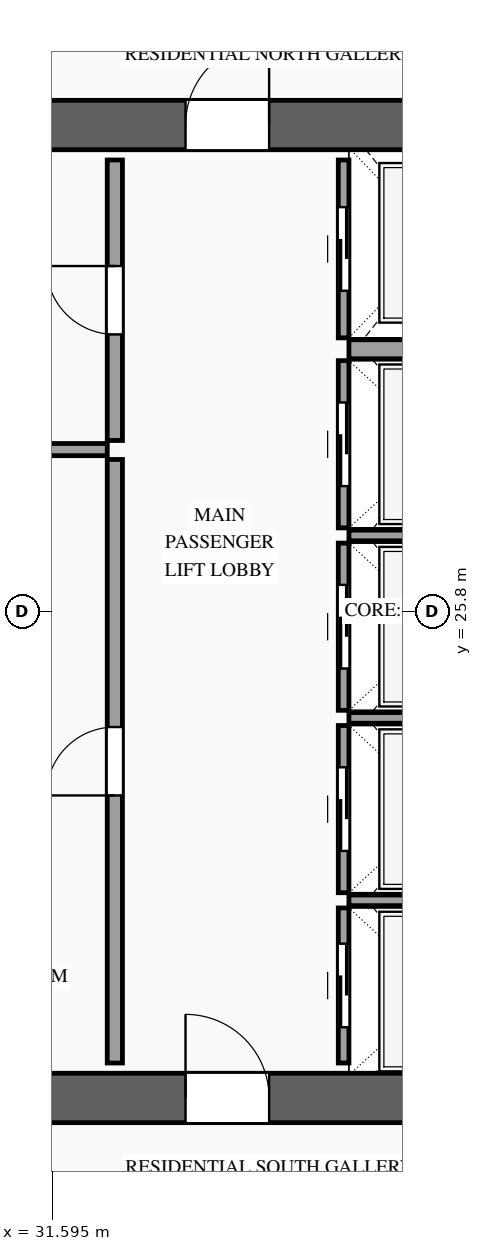
"""IFC4 building model, lengths in metres.
Left out: names, types, materials, properties, quantities, classifications, styles, units other than length and angle.
Written with IfcOpenShell. Run it as: python <this file> out.ifc"""

import sys

from ifc_helpers import new_model, si_unit, direction, frame, frame_2d, origin, place, context, subcontext, project, spatial, rectangle, extrude, source, transform, mapped, element, fill, save


model = new_model("IFC4")
c1 = context("Model", 3, precision=1e-05, world=origin(), true_north=direction((0.0, 1.0)))
c2 = subcontext(c1, "Body", "Model", "MODEL_VIEW")
j1 = project(units=[si_unit("LENGTHUNIT", "METRE"), si_unit("PLANEANGLEUNIT", "RADIAN")], contexts=[c1])
p1 = place(None, origin())
s1 = spatial("IfcSite", under=j1, at=p1, CompositionType="ELEMENT")
p2 = place(p1, origin())
s2 = spatial("IfcBuilding", under=s1, at=p2, CompositionType="ELEMENT")
p3 = place(p2, frame((0.0, 0.0, 195.0)))
s3 = spatial("IfcBuildingStorey", under=s2, at=p3, CompositionType="ELEMENT", Elevation=195.0)
p4 = place(p3, frame((23.475, 19.4, 0.0), z_axis=(0.0, 0.0, 1.0), x_axis=(1.0, 0.0, 0.0)))
e1 = element("IfcWall", 1, at=p4, inside=s3, PredefinedType="SHEAR", context=c2, shape_type="SweptSolid", body=[
    extrude(rectangle(XDim=27.05, YDim=0.65, at=frame_2d((13.525, 0.0))), origin(), (0.0, 0.0, 1.0), 3.5),
])
p5 = place(p4, frame((1.975, 0.0, 0.0)))
e2 = element("IfcOpeningElement", 2, at=p5, cuts=e1, PredefinedType="OPENING", context=c2, shape_type="SweptSolid", body=[
    extrude(rectangle(XDim=1.1, YDim=2.2, at=frame_2d((0.55, 1.1))), frame((0.0, 0.34, 0.0), z_axis=(0.0, -1.0, 0.0), x_axis=(1.0, 0.0, 0.0)), (0.0, 0.0, 1.0), 0.68),
])
p6 = place(p4, frame((9.875, 0.0, 0.0)))
e3 = element("IfcOpeningElement", 3, at=p6, cuts=e1, PredefinedType="OPENING", context=c2, shape_type="SweptSolid", body=[
    extrude(rectangle(XDim=1.1, YDim=2.2, at=frame_2d((0.55, 1.1))), frame((0.0, 0.34, 0.0), z_axis=(0.0, -1.0, 0.0), x_axis=(1.0, 0.0, 0.0)), (0.0, 0.0, 1.0), 0.68),
])
p7 = place(p4, frame((23.075, 0.0, 0.0)))
e4 = element("IfcOpeningElement", 4, at=p7, cuts=e1, PredefinedType="OPENING", context=c2, shape_type="SweptSolid", body=[
    extrude(rectangle(XDim=1.1, YDim=2.2, at=frame_2d((0.55, 1.1))), frame((0.0, 0.34, 0.0), z_axis=(0.0, -1.0, 0.0), x_axis=(1.0, 0.0, 0.0)), (0.0, 0.0, 1.0), 0.68),
])
p8 = place(p4, frame((19.695, 0.0, 0.0)))
e5 = element("IfcOpeningElement", 5, at=p8, cuts=e1, PredefinedType="OPENING", context=c2, shape_type="SweptSolid", body=[
    extrude(rectangle(XDim=0.9, YDim=2.15, at=frame_2d((0.45, 1.075))), frame((0.0, 0.34, 0.0), z_axis=(0.0, -1.0, 0.0), x_axis=(1.0, 0.0, 0.0)), (0.0, 0.0, 1.0), 0.68),
])
p9 = place(p4, frame((18.255, 0.0, 0.0)))
e6 = element("IfcOpeningElement", 6, at=p9, cuts=e1, PredefinedType="OPENING", context=c2, shape_type="SweptSolid", body=[
    extrude(rectangle(XDim=0.9, YDim=2.15, at=frame_2d((0.45, 1.075))), frame((0.0, 0.34, 0.0), z_axis=(0.0, -1.0, 0.0), x_axis=(1.0, 0.0, 0.0)), (0.0, 0.0, 1.0), 0.68),
])
p10 = place(p3, frame((23.475, 32.2, 0.0), z_axis=(0.0, 0.0, 1.0), x_axis=(1.0, 0.0, 0.0)))
e7 = element("IfcWall", 7, at=p10, inside=s3, PredefinedType="SHEAR", context=c2, shape_type="SweptSolid", body=[
    extrude(rectangle(XDim=27.05, YDim=0.65, at=frame_2d((13.525, 0.0))), origin(), (0.0, 0.0, 1.0), 3.5),
])
p11 = place(p10, frame((4.595, 0.0, 0.0)))
e8 = element("IfcOpeningElement", 8, at=p11, cuts=e7, PredefinedType="OPENING", context=c2, shape_type="SweptSolid", body=[
    extrude(rectangle(XDim=0.9, YDim=2.15, at=frame_2d((0.45, 1.075))), frame((0.0, 0.34, 0.0), z_axis=(0.0, -1.0, 0.0), x_axis=(1.0, 0.0, 0.0)), (0.0, 0.0, 1.0), 0.68),
])
p12 = place(p10, frame((9.875, 0.0, 0.0)))
e9 = element("IfcOpeningElement", 9, at=p12, cuts=e7, PredefinedType="OPENING", context=c2, shape_type="SweptSolid", body=[
    extrude(rectangle(XDim=1.1, YDim=2.2, at=frame_2d((0.55, 1.1))), frame((0.0, 0.34, 0.0), z_axis=(0.0, -1.0, 0.0), x_axis=(1.0, 0.0, 0.0)), (0.0, 0.0, 1.0), 0.68),
])
p13 = place(p10, frame((15.725, 0.0, 0.0)))
e10 = element("IfcOpeningElement", 10, at=p13, cuts=e7, PredefinedType="OPENING", context=c2, shape_type="SweptSolid", body=[
    extrude(rectangle(XDim=1.1, YDim=2.2, at=frame_2d((0.55, 1.1))), frame((0.0, 0.34, 0.0), z_axis=(0.0, -1.0, 0.0), x_axis=(1.0, 0.0, 0.0)), (0.0, 0.0, 1.0), 0.68),
])
p14 = place(p10, frame((18.255, 0.0, 0.0)))
e11 = element("IfcOpeningElement", 11, at=p14, cuts=e7, PredefinedType="OPENING", context=c2, shape_type="SweptSolid", body=[
    extrude(rectangle(XDim=0.9, YDim=2.15, at=frame_2d((0.45, 1.075))), frame((0.0, 0.34, 0.0), z_axis=(0.0, -1.0, 0.0), x_axis=(1.0, 0.0, 0.0)), (0.0, 0.0, 1.0), 0.68),
])
p15 = place(p10, frame((19.695, 0.0, 0.0)))
e12 = element("IfcOpeningElement", 12, at=p15, cuts=e7, PredefinedType="OPENING", context=c2, shape_type="SweptSolid", body=[
    extrude(rectangle(XDim=0.9, YDim=2.15, at=frame_2d((0.45, 1.075))), frame((0.0, 0.34, 0.0), z_axis=(0.0, -1.0, 0.0), x_axis=(1.0, 0.0, 0.0)), (0.0, 0.0, 1.0), 0.68),
])
p16 = place(p3, frame((35.43, 19.86, 0.0), z_axis=(0.0, 0.0, 1.0), x_axis=(0.0, 1.0, 0.0)))
e13 = element("IfcWall", 13, at=p16, inside=s3, PredefinedType="SOLIDWALL", context=c2, shape_type="SweptSolid", body=[
    extrude(rectangle(XDim=2.04, YDim=0.14, at=frame_2d((1.02, 0.0))), origin(), (0.0, 0.0, 1.0), 3.28),
])
p17 = place(p16, frame((0.47, 0.0, 0.0)))
e14 = element("IfcOpeningElement", 14, at=p17, cuts=e13, PredefinedType="OPENING", context=c2, shape_type="SweptSolid", body=[
    extrude(rectangle(XDim=1.1, YDim=2.2, at=frame_2d((0.55, 1.1))), frame((0.0, 0.085, 0.0), z_axis=(0.0, -1.0, 0.0), x_axis=(1.0, 0.0, 0.0)), (0.0, 0.0, 1.0), 0.17),
])
m1 = source(origin(), c2, "Body", "SweptSolid", [
    extrude(rectangle(XDim=2.4, YDim=0.14, at=frame_2d((1.2, 0.0))), origin(), (0.0, 0.0, 1.0), 3.28),
])
p18 = place(p3, frame((35.5, 22.0, 0.0), z_axis=(0.0, 0.0, 1.0), x_axis=(1.0, 0.0, 0.0)))
e15 = element("IfcWall", 15, at=p18, inside=s3, PredefinedType="SOLIDWALL", context=c2, shape_type="MappedRepresentation", body=[
    mapped(m1, transform((0.0, 0.0, 0.0), scale=1.0)),
])
p19 = place(p3, frame((35.43, 22.1, 0.0), z_axis=(0.0, 0.0, 1.0), x_axis=(0.0, 1.0, 0.0)))
e16 = element("IfcWall", 16, at=p19, inside=s3, PredefinedType="SOLIDWALL", context=c2, shape_type="SweptSolid", body=[
    extrude(rectangle(XDim=2.2, YDim=0.14, at=frame_2d((1.1, 0.0))), origin(), (0.0, 0.0, 1.0), 3.28),
])
p20 = place(p19, frame((0.55, 0.0, 0.0)))
e17 = element("IfcOpeningElement", 17, at=p20, cuts=e16, PredefinedType="OPENING", context=c2, shape_type="SweptSolid", body=[
    extrude(rectangle(XDim=1.1, YDim=2.2, at=frame_2d((0.55, 1.1))), frame((0.0, 0.085, 0.0), z_axis=(0.0, -1.0, 0.0), x_axis=(1.0, 0.0, 0.0)), (0.0, 0.0, 1.0), 0.17),
])
p21 = place(p3, frame((35.5, 24.4, 0.0), z_axis=(0.0, 0.0, 1.0), x_axis=(1.0, 0.0, 0.0)))
e18 = element("IfcWall", 18, at=p21, inside=s3, PredefinedType="SOLIDWALL", context=c2, shape_type="MappedRepresentation", body=[
    mapped(m1, transform((0.0, 0.0, 0.0), scale=1.0)),
])
p22 = place(p3, frame((35.43, 24.5, 0.0), z_axis=(0.0, 0.0, 1.0), x_axis=(0.0, 1.0, 0.0)))
e19 = element("IfcWall", 19, at=p22, inside=s3, PredefinedType="SOLIDWALL", context=c2, shape_type="SweptSolid", body=[
    extrude(rectangle(XDim=2.2, YDim=0.14, at=frame_2d((1.1, 0.0))), origin(), (0.0, 0.0, 1.0), 3.28),
])
p23 = place(p22, frame((0.55, 0.0, 0.0)))
e20 = element("IfcOpeningElement", 20, at=p23, cuts=e19, PredefinedType="OPENING", context=c2, shape_type="SweptSolid", body=[
    extrude(rectangle(XDim=1.1, YDim=2.2, at=frame_2d((0.55, 1.1))), frame((0.0, 0.085, 0.0), z_axis=(0.0, -1.0, 0.0), x_axis=(1.0, 0.0, 0.0)), (0.0, 0.0, 1.0), 0.17),
])
p24 = place(p3, frame((35.5, 26.8, 0.0), z_axis=(0.0, 0.0, 1.0), x_axis=(1.0, 0.0, 0.0)))
e21 = element("IfcWall", 21, at=p24, inside=s3, PredefinedType="SOLIDWALL", context=c2, shape_type="MappedRepresentation", body=[
    mapped(m1, transform((0.0, 0.0, 0.0), scale=1.0)),
])
p25 = place(p3, frame((35.43, 26.9, 0.0), z_axis=(0.0, 0.0, 1.0), x_axis=(0.0, 1.0, 0.0)))
e22 = element("IfcWall", 22, at=p25, inside=s3, PredefinedType="SOLIDWALL", context=c2, shape_type="SweptSolid", body=[
    extrude(rectangle(XDim=2.2, YDim=0.14, at=frame_2d((1.1, 0.0))), origin(), (0.0, 0.0, 1.0), 3.28),
])
p26 = place(p25, frame((0.55, 0.0, 0.0)))
e23 = element("IfcOpeningElement", 23, at=p26, cuts=e22, PredefinedType="OPENING", context=c2, shape_type="SweptSolid", body=[
    extrude(rectangle(XDim=1.1, YDim=2.2, at=frame_2d((0.55, 1.1))), frame((0.0, 0.085, 0.0), z_axis=(0.0, -1.0, 0.0), x_axis=(1.0, 0.0, 0.0)), (0.0, 0.0, 1.0), 0.17),
])
p27 = place(p3, frame((35.43, 29.4, 0.0), z_axis=(0.0, 0.0, 1.0), x_axis=(0.0, 1.0, 0.0)))
e24 = element("IfcWall", 24, at=p27, inside=s3, PredefinedType="SOLIDWALL", context=c2, shape_type="SweptSolid", body=[
    extrude(rectangle(XDim=2.34, YDim=0.14, at=frame_2d((1.17, 0.0))), origin(), (0.0, 0.0, 1.0), 3.28),
])
p28 = place(p27, frame((0.62, 0.0, 0.0)))
e25 = element("IfcOpeningElement", 25, at=p28, cuts=e24, PredefinedType="OPENING", context=c2, shape_type="SweptSolid", body=[
    extrude(rectangle(XDim=1.1, YDim=2.2, at=frame_2d((0.55, 1.1))), frame((0.0, 0.085, 0.0), z_axis=(0.0, -1.0, 0.0), x_axis=(1.0, 0.0, 0.0)), (0.0, 0.0, 1.0), 0.17),
])
m2 = source(origin(), c2, "Body", "SweptSolid", [
    extrude(rectangle(XDim=2.4, YDim=0.25, at=frame_2d((1.2, 0.0))), origin(), (0.0, 0.0, 1.0), 3.28),
])
p29 = place(p3, frame((35.5, 29.25, 0.0), z_axis=(0.0, 0.0, 1.0), x_axis=(1.0, 0.0, 0.0)))
e26 = element("IfcWall", 26, at=p29, inside=s3, PredefinedType="SOLIDWALL", context=c2, shape_type="MappedRepresentation", body=[
    mapped(m2, transform((0.0, 0.0, 0.0), scale=1.0)),
])
p30 = place(p3, frame((32.42, 19.86, 0.0), z_axis=(0.0, 0.0, 1.0), x_axis=(0.0, 1.0, 0.0)))
e27 = element("IfcWall", 27, at=p30, inside=s3, PredefinedType="PARTITIONING", context=c2, shape_type="SweptSolid", body=[
    extrude(rectangle(XDim=7.94, YDim=0.2, at=frame_2d((3.97, 0.0))), origin(), (0.0, 0.0, 1.0), 3.28),
])
p31 = place(p30, frame((3.52, 0.0, 0.0)))
e28 = element("IfcOpeningElement", 28, at=p31, cuts=e27, PredefinedType="OPENING", context=c2, shape_type="SweptSolid", body=[
    extrude(rectangle(XDim=0.9, YDim=2.15, at=frame_2d((0.45, 1.075))), frame((0.0, 0.115, 0.0), z_axis=(0.0, -1.0, 0.0), x_axis=(1.0, 0.0, 0.0)), (0.0, 0.0, 1.0), 0.23),
])
p32 = place(p3, frame((32.42, 28.05, 0.0), z_axis=(0.0, 0.0, 1.0), x_axis=(0.0, 1.0, 0.0)))
e29 = element("IfcWall", 29, at=p32, inside=s3, PredefinedType="PARTITIONING", context=c2, shape_type="SweptSolid", body=[
    extrude(rectangle(XDim=3.69, YDim=0.2, at=frame_2d((1.845, 0.0))), origin(), (0.0, 0.0, 1.0), 3.28),
])
p33 = place(p32, frame((1.395, 0.0, 0.0)))
e30 = element("IfcOpeningElement", 30, at=p33, cuts=e29, PredefinedType="OPENING", context=c2, shape_type="SweptSolid", body=[
    extrude(rectangle(XDim=0.9, YDim=2.15, at=frame_2d((0.45, 1.075))), frame((0.0, 0.115, 0.0), z_axis=(0.0, -1.0, 0.0), x_axis=(1.0, 0.0, 0.0)), (0.0, 0.0, 1.0), 0.23),
])
m3 = source(origin(), c2, "Body", "SweptSolid", [
    extrude(rectangle(XDim=2.47, YDim=0.16, at=frame_2d((1.235, 0.0))), origin(), (0.0, 0.0, 1.0), 3.28),
])
p34 = place(p3, frame((29.85, 27.93, 0.0), z_axis=(0.0, 0.0, 1.0), x_axis=(1.0, 0.0, 0.0)))
e31 = element("IfcWall", 31, at=p34, inside=s3, PredefinedType="PARTITIONING", context=c2, shape_type="MappedRepresentation", body=[
    mapped(m3, transform((0.0, 0.0, 0.0), scale=1.0)),
])
m4 = source(origin(), c2, "Body", "SweptSolid", [
    extrude(rectangle(XDim=1.1, YDim=2.2, at=frame_2d((0.55, 1.1))), frame((0.0, 0.025, 0.0), z_axis=(0.0, -1.0, 0.0), x_axis=(1.0, 0.0, 0.0)), (0.0, 0.0, 1.0), 0.05),
])
p35 = place(p17, origin())
e32 = element("IfcDoor", 32, at=p35, inside=s3, OperationType="SLIDING_TO_RIGHT", PredefinedType="DOOR", context=c2, shape_type="MappedRepresentation", body=[
    mapped(m4, transform((0.0, 0.0, 0.0), scale=1.0)),
])
fill(e14, e32)
p36 = place(p20, origin())
e33 = element("IfcDoor", 33, at=p36, inside=s3, OperationType="SLIDING_TO_LEFT", PredefinedType="DOOR", context=c2, shape_type="MappedRepresentation", body=[
    mapped(m4, transform((0.0, 0.0, 0.0), scale=1.0)),
])
fill(e17, e33)
p37 = place(p23, origin())
e34 = element("IfcDoor", 34, at=p37, inside=s3, OperationType="SLIDING_TO_RIGHT", PredefinedType="DOOR", context=c2, shape_type="MappedRepresentation", body=[
    mapped(m4, transform((0.0, 0.0, 0.0), scale=1.0)),
])
fill(e20, e34)
p38 = place(p26, origin())
e35 = element("IfcDoor", 35, at=p38, inside=s3, OperationType="SLIDING_TO_LEFT", PredefinedType="DOOR", context=c2, shape_type="MappedRepresentation", body=[
    mapped(m4, transform((0.0, 0.0, 0.0), scale=1.0)),
])
fill(e23, e35)
p39 = place(p28, origin())
e36 = element("IfcDoor", 36, at=p39, inside=s3, OperationType="SLIDING_TO_RIGHT", PredefinedType="DOOR", context=c2, shape_type="MappedRepresentation", body=[
    mapped(m4, transform((0.0, 0.0, 0.0), scale=1.0)),
])
fill(e25, e36)
m5 = source(origin(), c2, "Body", "SweptSolid", [
    extrude(rectangle(XDim=1.1, YDim=2.2, at=frame_2d((0.55, 1.1))), frame((0.0, 0.025, 0.0), z_axis=(0.0, -1.0, 0.0), x_axis=(1.0, 0.0, 0.0)), (0.0, 0.0, 1.0), 0.05),
])
p40 = place(p6, origin())
e37 = element("IfcDoor", 37, at=p40, inside=s3, OperationType="SINGLE_SWING_LEFT", PredefinedType="DOOR", context=c2, shape_type="MappedRepresentation", body=[
    mapped(m5, transform((0.0, 0.0, 0.0), scale=1.0)),
])
fill(e3, e37)
p41 = place(p12, origin())
e38 = element("IfcDoor", 38, at=p41, inside=s3, OperationType="SINGLE_SWING_RIGHT", PredefinedType="DOOR", context=c2, shape_type="MappedRepresentation", body=[
    mapped(m5, transform((0.0, 0.0, 0.0), scale=1.0)),
])
fill(e9, e38)
m6 = source(origin(), c2, "Body", "SweptSolid", [
    extrude(rectangle(XDim=0.9, YDim=2.15, at=frame_2d((0.45, 1.075))), frame((0.0, 0.025, 0.0), z_axis=(0.0, -1.0, 0.0), x_axis=(1.0, 0.0, 0.0)), (0.0, 0.0, 1.0), 0.05),
])
p42 = place(p31, origin())
e39 = element("IfcDoor", 39, at=p42, inside=s3, OperationType="SINGLE_SWING_LEFT", PredefinedType="DOOR", context=c2, shape_type="MappedRepresentation", body=[
    mapped(m6, transform((0.0, 0.0, 0.0), scale=1.0)),
])
fill(e28, e39)
p43 = place(p33, origin())
e40 = element("IfcDoor", 40, at=p43, inside=s3, OperationType="SINGLE_SWING_RIGHT", PredefinedType="DOOR", context=c2, shape_type="MappedRepresentation", body=[
    mapped(m6, transform((0.0, 0.0, 0.0), scale=1.0)),
])
fill(e30, e40)
save(model, sys.argv[1])
